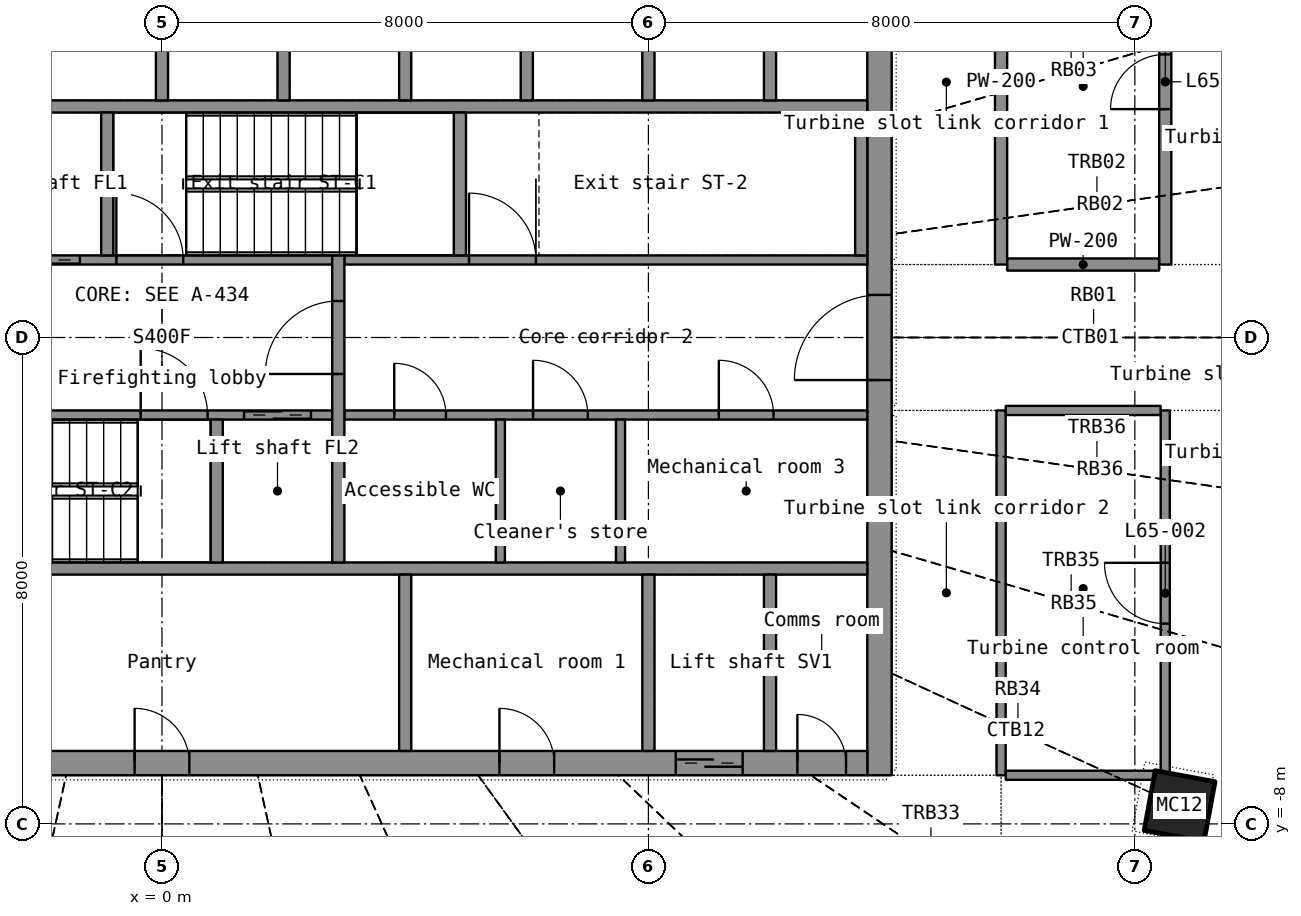
"""IFC4 building model, lengths in metres.
Left out: names, types, materials, properties, quantities, classifications, styles, units other than length and angle.
Written with IfcOpenShell. Run it as: python <this file> out.ifc"""

import sys

from ifc_helpers import new_model, si_unit, direction, frame, frame_2d, origin, origin_2d, place, context, subcontext, project, spatial, rectangle, hollow_rectangle, extrude, element, fill, save


model = new_model("IFC4")
c1 = context("Model", 3, precision=1e-05, world=origin(), true_north=direction((0.0, 1.0)))
c2 = subcontext(c1, "Body", "Model", "MODEL_VIEW")
j1 = project(units=[si_unit("LENGTHUNIT", "METRE"), si_unit("PLANEANGLEUNIT", "RADIAN")], contexts=[c1])
p1 = place(None, origin())
s1 = spatial("IfcSite", under=j1, at=p1, CompositionType="ELEMENT")
p2 = place(p1, origin())
s2 = spatial("IfcBuilding", under=s1, at=p2, CompositionType="ELEMENT")
p3 = place(p2, frame((0.0, 0.0, 265.2)))
s3 = spatial("IfcBuildingStorey", under=s2, at=p3, CompositionType="ELEMENT", Elevation=265.2)
p4 = place(p3, frame((16.736, -7.706, 0.0), z_axis=(-0.02993968, 0.014178483, 0.999451142), x_axis=(-0.58479336, -0.811160032, -0.006010807)))
e1 = element("IfcColumn", 1, at=p4, inside=s3, PredefinedType="COLUMN", context=c2, shape_type="SweptSolid", body=[
    extrude(hollow_rectangle(XDim=1.0, YDim=1.0, WallThickness=0.032, at=origin_2d()), origin(), (0.0, 0.0, 1.0), 7.404),
])
p5 = place(p3, frame((11.8, -7.2, 0.0), z_axis=(0.0, 0.0, 1.0), x_axis=(0.0, 1.0, 0.0)))
e2 = element("IfcWall", 2, at=p5, inside=s3, PredefinedType="SHEAR", context=c2, shape_type="SweptSolid", body=[
    extrude(rectangle(XDim=14.4, YDim=0.4, at=frame_2d((7.2, 0.0))), origin(), (0.0, 0.0, 1.0), 6.9),
])
p6 = place(p5, frame((6.5, 0.0, 0.0)))
e3 = element("IfcOpeningElement", 3, at=p6, cuts=e2, PredefinedType="OPENING", context=c2, shape_type="SweptSolid", body=[
    extrude(rectangle(XDim=1.4, YDim=2.2, at=frame_2d((0.7, 1.1))), frame((0.0, 0.21, 0.0), z_axis=(0.0, -1.0, 0.0), x_axis=(1.0, 0.0, 0.0)), (0.0, 0.0, 1.0), 0.42),
])
p7 = place(p3, frame((-11.6, -7.0, 0.0), z_axis=(0.0, 0.0, 1.0), x_axis=(1.0, 0.0, 0.0)))
e4 = element("IfcWall", 4, at=p7, inside=s3, PredefinedType="SHEAR", context=c2, shape_type="SweptSolid", body=[
    extrude(rectangle(XDim=23.2, YDim=0.4, at=frame_2d((11.6, 0.0))), origin(), (0.0, 0.0, 1.0), 6.9),
])
p8 = place(p7, frame((20.05, 0.0, 0.0)))
e5 = element("IfcOpeningElement", 5, at=p8, cuts=e4, PredefinedType="OPENING", context=c2, shape_type="SweptSolid", body=[
    extrude(rectangle(XDim=1.1, YDim=2.2, at=frame_2d((0.55, 1.1))), frame((0.0, 0.21, 0.0), z_axis=(0.0, -1.0, 0.0), x_axis=(1.0, 0.0, 0.0)), (0.0, 0.0, 1.0), 0.42),
])
p9 = place(p7, frame((4.15, 0.0, 0.0)))
e6 = element("IfcOpeningElement", 6, at=p9, cuts=e4, PredefinedType="OPENING", context=c2, shape_type="SweptSolid", body=[
    extrude(rectangle(XDim=0.9, YDim=2.1, at=frame_2d((0.45, 1.05))), frame((0.0, 0.21, 0.0), z_axis=(0.0, -1.0, 0.0), x_axis=(1.0, 0.0, 0.0)), (0.0, 0.0, 1.0), 0.42),
])
p10 = place(p7, frame((11.15, 0.0, 0.0)))
e7 = element("IfcOpeningElement", 7, at=p10, cuts=e4, PredefinedType="OPENING", context=c2, shape_type="SweptSolid", body=[
    extrude(rectangle(XDim=0.9, YDim=2.1, at=frame_2d((0.45, 1.05))), frame((0.0, 0.21, 0.0), z_axis=(0.0, -1.0, 0.0), x_axis=(1.0, 0.0, 0.0)), (0.0, 0.0, 1.0), 0.42),
])
p11 = place(p7, frame((17.15, 0.0, 0.0)))
e8 = element("IfcOpeningElement", 8, at=p11, cuts=e4, PredefinedType="OPENING", context=c2, shape_type="SweptSolid", body=[
    extrude(rectangle(XDim=0.9, YDim=2.1, at=frame_2d((0.45, 1.05))), frame((0.0, 0.21, 0.0), z_axis=(0.0, -1.0, 0.0), x_axis=(1.0, 0.0, 0.0)), (0.0, 0.0, 1.0), 0.42),
])
p12 = place(p7, frame((0.35, 0.0, 0.0)))
e9 = element("IfcOpeningElement", 9, at=p12, cuts=e4, PredefinedType="OPENING", context=c2, shape_type="SweptSolid", body=[
    extrude(rectangle(XDim=0.8, YDim=2.05, at=frame_2d((0.4, 1.025))), frame((0.0, 0.21, 0.0), z_axis=(0.0, -1.0, 0.0), x_axis=(1.0, 0.0, 0.0)), (0.0, 0.0, 1.0), 0.42),
])
p13 = place(p7, frame((22.05, 0.0, 0.0)))
e10 = element("IfcOpeningElement", 10, at=p13, cuts=e4, PredefinedType="OPENING", context=c2, shape_type="SweptSolid", body=[
    extrude(rectangle(XDim=0.8, YDim=2.05, at=frame_2d((0.4, 1.025))), frame((0.0, 0.21, 0.0), z_axis=(0.0, -1.0, 0.0), x_axis=(1.0, 0.0, 0.0)), (0.0, 0.0, 1.0), 0.42),
])
for number, where, z_axis, x_axis in (
    (11, (-11.6, -3.8, 0.0), (0.0, 0.0, 1.0), (1.0, 0.0, 0.0)),
    (12, (-11.6, 3.8, 0.0), (0.0, 0.0, 1.0), (1.0, 0.0, 0.0)),
):
    element("IfcWall", number, at=place(p3, frame(where, z_axis=z_axis, x_axis=x_axis)), inside=s3, PredefinedType="SHEAR", context=c2, shape_type="SweptSolid", body=[
        extrude(rectangle(XDim=23.2, YDim=0.2, at=frame_2d((11.6, 0.0))), origin(), (0.0, 0.0, 1.0), 6.9),
    ])
for number, where, z_axis, x_axis in (
    (13, (8.0, -6.8, 0.0), (0.0, 0.0, 1.0), (0.0, 1.0, 0.0)),
    (14, (10.0, -6.8, 0.0), (0.0, 0.0, 1.0), (0.0, 1.0, 0.0)),
):
    element("IfcWall", number, at=place(p3, frame(where, z_axis=z_axis, x_axis=x_axis)), inside=s3, PredefinedType="SHEAR", context=c2, shape_type="SweptSolid", body=[
        extrude(rectangle(XDim=2.9, YDim=0.2, at=frame_2d((1.45, 0.0))), origin(), (0.0, 0.0, 1.0), 6.9),
    ])
p14 = place(p3, frame((4.0, -6.8, 0.0), z_axis=(0.0, 0.0, 1.0), x_axis=(0.0, 1.0, 0.0)))
e15 = element("IfcWall", 15, at=p14, inside=s3, PredefinedType="PARTITIONING", context=c2, shape_type="SweptSolid", body=[
    extrude(rectangle(XDim=2.9, YDim=0.2, at=frame_2d((1.45, 0.0))), origin(), (0.0, 0.0, 1.0), 6.9),
])
for number, where, z_axis, x_axis in (
    (16, (0.0, 3.9, 0.0), (0.0, 0.0, 1.0), (0.0, 1.0, 0.0)),
    (17, (2.0, 3.9, 0.0), (0.0, 0.0, 1.0), (0.0, 1.0, 0.0)),
    (18, (4.0, 3.9, 0.0), (0.0, 0.0, 1.0), (0.0, 1.0, 0.0)),
    (19, (6.0, 3.9, 0.0), (0.0, 0.0, 1.0), (0.0, 1.0, 0.0)),
    (20, (8.0, 3.9, 0.0), (0.0, 0.0, 1.0), (0.0, 1.0, 0.0)),
    (21, (10.0, 3.9, 0.0), (0.0, 0.0, 1.0), (0.0, 1.0, 0.0)),
):
    element("IfcWall", number, at=place(p3, frame(where, z_axis=z_axis, x_axis=x_axis)), inside=s3, PredefinedType="SHEAR", context=c2, shape_type="SweptSolid", body=[
        extrude(rectangle(XDim=2.9, YDim=0.2, at=frame_2d((1.45, 0.0))), origin(), (0.0, 0.0, 1.0), 6.9),
    ])
p15 = place(p3, frame((-2.8, -1.275, 0.0), z_axis=(0.0, 0.0, 1.0), x_axis=(1.0, 0.0, 0.0)))
e22 = element("IfcWall", 22, at=p15, inside=s3, PredefinedType="SHEAR", context=c2, shape_type="SweptSolid", body=[
    extrude(rectangle(XDim=5.6, YDim=0.15, at=frame_2d((2.8, 0.0))), origin(), (0.0, 0.0, 1.0), 6.9),
])
p16 = place(p15, frame((4.15, 0.0, 0.0)))
e23 = element("IfcOpeningElement", 23, at=p16, cuts=e22, PredefinedType="OPENING", context=c2, shape_type="SweptSolid", body=[
    extrude(rectangle(XDim=1.1, YDim=2.2, at=frame_2d((0.55, 1.1))), frame((0.0, 0.085, 0.0), z_axis=(0.0, -1.0, 0.0), x_axis=(1.0, 0.0, 0.0)), (0.0, 0.0, 1.0), 0.17),
])
p17 = place(p15, frame((2.45, 0.0, 0.0)))
e24 = element("IfcOpeningElement", 24, at=p17, cuts=e22, PredefinedType="OPENING", context=c2, shape_type="SweptSolid", body=[
    extrude(rectangle(XDim=1.1, YDim=2.15, at=frame_2d((0.55, 1.075))), frame((0.0, 0.085, 0.0), z_axis=(0.0, -1.0, 0.0), x_axis=(1.0, 0.0, 0.0)), (0.0, 0.0, 1.0), 0.17),
])
p18 = place(p3, frame((3.0, -1.275, 0.0), z_axis=(0.0, 0.0, 1.0), x_axis=(1.0, 0.0, 0.0)))
e25 = element("IfcWall", 25, at=p18, inside=s3, PredefinedType="PARTITIONING", context=c2, shape_type="SweptSolid", body=[
    extrude(rectangle(XDim=8.6, YDim=0.15, at=frame_2d((4.3, 0.0))), origin(), (0.0, 0.0, 1.0), 6.9),
])
p19 = place(p18, frame((0.82, 0.0, 0.0)))
e26 = element("IfcOpeningElement", 26, at=p19, cuts=e25, PredefinedType="OPENING", context=c2, shape_type="SweptSolid", body=[
    extrude(rectangle(XDim=0.85, YDim=2.1, at=frame_2d((0.425, 1.05))), frame((0.0, 0.085, 0.0), z_axis=(0.0, -1.0, 0.0), x_axis=(1.0, 0.0, 0.0)), (0.0, 0.0, 1.0), 0.17),
])
p20 = place(p18, frame((3.103, 0.0, 0.0)))
e27 = element("IfcOpeningElement", 27, at=p20, cuts=e25, PredefinedType="OPENING", context=c2, shape_type="SweptSolid", body=[
    extrude(rectangle(XDim=0.9, YDim=2.1, at=frame_2d((0.45, 1.05))), frame((0.0, 0.085, 0.0), z_axis=(0.0, -1.0, 0.0), x_axis=(1.0, 0.0, 0.0)), (0.0, 0.0, 1.0), 0.17),
])
p21 = place(p18, frame((6.158, 0.0, 0.0)))
e28 = element("IfcOpeningElement", 28, at=p21, cuts=e25, PredefinedType="OPENING", context=c2, shape_type="SweptSolid", body=[
    extrude(rectangle(XDim=0.9, YDim=2.1, at=frame_2d((0.45, 1.05))), frame((0.0, 0.085, 0.0), z_axis=(0.0, -1.0, 0.0), x_axis=(1.0, 0.0, 0.0)), (0.0, 0.0, 1.0), 0.17),
])
p22 = place(p3, frame((-2.8, 1.275, 0.0), z_axis=(0.0, 0.0, 1.0), x_axis=(1.0, 0.0, 0.0)))
e29 = element("IfcWall", 29, at=p22, inside=s3, PredefinedType="SHEAR", context=c2, shape_type="SweptSolid", body=[
    extrude(rectangle(XDim=5.6, YDim=0.15, at=frame_2d((2.8, 0.0))), origin(), (0.0, 0.0, 1.0), 6.9),
])
p23 = place(p22, frame((0.35, 0.0, 0.0)))
e30 = element("IfcOpeningElement", 30, at=p23, cuts=e29, PredefinedType="OPENING", context=c2, shape_type="SweptSolid", body=[
    extrude(rectangle(XDim=1.1, YDim=2.2, at=frame_2d((0.55, 1.1))), frame((0.0, 0.085, 0.0), z_axis=(0.0, -1.0, 0.0), x_axis=(1.0, 0.0, 0.0)), (0.0, 0.0, 1.0), 0.17),
])
p24 = place(p22, frame((2.05, 0.0, 0.0)))
e31 = element("IfcOpeningElement", 31, at=p24, cuts=e29, PredefinedType="OPENING", context=c2, shape_type="SweptSolid", body=[
    extrude(rectangle(XDim=1.1, YDim=2.15, at=frame_2d((0.55, 1.075))), frame((0.0, 0.085, 0.0), z_axis=(0.0, -1.0, 0.0), x_axis=(1.0, 0.0, 0.0)), (0.0, 0.0, 1.0), 0.17),
])
p25 = place(p3, frame((3.0, 1.275, 0.0), z_axis=(0.0, 0.0, 1.0), x_axis=(1.0, 0.0, 0.0)))
e32 = element("IfcWall", 32, at=p25, inside=s3, PredefinedType="SHEAR", context=c2, shape_type="SweptSolid", body=[
    extrude(rectangle(XDim=8.6, YDim=0.15, at=frame_2d((4.3, 0.0))), origin(), (0.0, 0.0, 1.0), 6.9),
])
p26 = place(p25, frame((2.05, 0.0, 0.0)))
e33 = element("IfcOpeningElement", 33, at=p26, cuts=e32, PredefinedType="OPENING", context=c2, shape_type="SweptSolid", body=[
    extrude(rectangle(XDim=1.1, YDim=2.15, at=frame_2d((0.55, 1.075))), frame((0.0, 0.085, 0.0), z_axis=(0.0, -1.0, 0.0), x_axis=(1.0, 0.0, 0.0)), (0.0, 0.0, 1.0), 0.17),
])
p27 = place(p3, frame((2.9, -3.7, 0.0), z_axis=(0.0, 0.0, 1.0), x_axis=(0.0, 1.0, 0.0)))
e34 = element("IfcWall", 34, at=p27, inside=s3, PredefinedType="SHEAR", context=c2, shape_type="SweptSolid", body=[
    extrude(rectangle(XDim=5.05, YDim=0.2, at=frame_2d((2.525, 0.0))), origin(), (0.0, 0.0, 1.0), 6.9),
])
p28 = place(p27, frame((3.1, 0.0, 0.0)))
e35 = element("IfcOpeningElement", 35, at=p28, cuts=e34, PredefinedType="OPENING", context=c2, shape_type="SweptSolid", body=[
    extrude(rectangle(XDim=1.2, YDim=2.2, at=frame_2d((0.6, 1.1))), frame((0.0, 0.11, 0.0), z_axis=(0.0, -1.0, 0.0), x_axis=(1.0, 0.0, 0.0)), (0.0, 0.0, 1.0), 0.22),
])
for number, where, z_axis, x_axis in (
    (36, (-0.9, 1.35, 0.0), (0.0, 0.0, 1.0), (0.0, 1.0, 0.0)),
    (37, (0.9, -3.7, 0.0), (0.0, 0.0, 1.0), (0.0, 1.0, 0.0)),
    (38, (11.5, 1.35, 0.0), (0.0, 0.0, 1.0), (0.0, 1.0, 0.0)),
    (39, (4.9, 1.35, 0.0), (0.0, 0.0, 1.0), (0.0, 1.0, 0.0)),
):
    element("IfcWall", number, at=place(p3, frame(where, z_axis=z_axis, x_axis=x_axis)), inside=s3, PredefinedType="SHEAR", context=c2, shape_type="SweptSolid", body=[
        extrude(rectangle(XDim=2.35, YDim=0.2, at=frame_2d((1.175, 0.0))), origin(), (0.0, 0.0, 1.0), 6.9),
    ])
for number, where, z_axis, x_axis in (
    (40, (5.565, -3.7, 0.0), (0.0, 0.0, 1.0), (0.0, 1.0, 0.0)),
    (41, (7.541, -3.7, 0.0), (0.0, 0.0, 1.0), (0.0, 1.0, 0.0)),
):
    element("IfcWall", number, at=place(p3, frame(where, z_axis=z_axis, x_axis=x_axis)), inside=s3, PredefinedType="PARTITIONING", context=c2, shape_type="SweptSolid", body=[
        extrude(rectangle(XDim=2.35, YDim=0.15, at=frame_2d((1.175, 0.0))), origin(), (0.0, 0.0, 1.0), 6.9),
    ])
p29 = place(p3, frame((16.5, -7.212, 0.0), z_axis=(0.0, 0.0, 1.0), x_axis=(0.0, 1.0, 0.0)))
e42 = element("IfcWall", 42, at=p29, inside=s3, PredefinedType="PARTITIONING", context=c2, shape_type="SweptSolid", body=[
    extrude(rectangle(XDim=6.012, YDim=0.15, at=frame_2d((3.006, 0.0))), origin(), (0.0, 0.0, 1.0), 6.1),
])
p30 = place(p29, frame((2.506, 0.0, 0.0)))
e43 = element("IfcOpeningElement", 43, at=p30, cuts=e42, PredefinedType="OPENING", context=c2, shape_type="SweptSolid", body=[
    extrude(rectangle(XDim=1.0, YDim=2.2, at=frame_2d((0.5, 1.1))), frame((0.0, 0.085, 0.0), z_axis=(0.0, -1.0, 0.0), x_axis=(1.0, 0.0, 0.0)), (0.0, 0.0, 1.0), 0.17),
])
p31 = place(p3, frame((16.5, 1.2, 0.0), z_axis=(0.0, 0.0, 1.0), x_axis=(0.0, 1.0, 0.0)))
e44 = element("IfcWall", 44, at=p31, inside=s3, PredefinedType="PARTITIONING", context=c2, shape_type="SweptSolid", body=[
    extrude(rectangle(XDim=6.012, YDim=0.2, at=frame_2d((3.006, 0.0))), origin(), (0.0, 0.0, 1.0), 6.1),
])
p32 = place(p31, frame((2.556, 0.0, 0.0)))
e45 = element("IfcOpeningElement", 45, at=p32, cuts=e44, PredefinedType="OPENING", context=c2, shape_type="SweptSolid", body=[
    extrude(rectangle(XDim=0.9, YDim=2.1, at=frame_2d((0.45, 1.05))), frame((0.0, 0.11, 0.0), z_axis=(0.0, -1.0, 0.0), x_axis=(1.0, 0.0, 0.0)), (0.0, 0.0, 1.0), 0.22),
])
p33 = place(p3, frame((13.8, -7.2, 0.0), z_axis=(0.0, 0.0, 1.0), x_axis=(0.0, 1.0, 0.0)))
e46 = element("IfcWall", 46, at=p33, inside=s3, PredefinedType="PARTITIONING", context=c2, shape_type="SweptSolid", body=[
    extrude(rectangle(XDim=6.0, YDim=0.15, at=frame_2d((3.0, 0.0))), origin(), (0.0, 0.0, 1.0), 6.1),
])
p34 = place(p3, frame((13.8, 1.2, 0.0), z_axis=(0.0, 0.0, 1.0), x_axis=(0.0, 1.0, 0.0)))
e47 = element("IfcWall", 47, at=p34, inside=s3, PredefinedType="PARTITIONING", context=c2, shape_type="SweptSolid", body=[
    extrude(rectangle(XDim=6.0, YDim=0.2, at=frame_2d((3.0, 0.0))), origin(), (0.0, 0.0, 1.0), 6.1),
])
for number, where, z_axis, x_axis in (
    (48, (13.877, -7.2, 0.0), (0.0, 0.0, 1.0), (1.0, 0.0, 0.0)),
    (49, (13.877, -1.2, 0.0), (0.0, 0.0, 1.0), (1.0, 0.0, 0.0)),
):
    element("IfcWall", number, at=place(p3, frame(where, z_axis=z_axis, x_axis=x_axis)), inside=s3, PredefinedType="PARTITIONING", context=c2, shape_type="SweptSolid", body=[
        extrude(rectangle(XDim=2.546, YDim=0.15, at=frame_2d((1.273, 0.0))), origin(), (0.0, 0.0, 1.0), 6.1),
    ])
p35 = place(p3, frame((16.398, 1.2, 0.0), z_axis=(0.0, 0.0, 1.0), x_axis=(-1.0, 0.0, 0.0)))
e50 = element("IfcWall", 50, at=p35, inside=s3, PredefinedType="PARTITIONING", context=c2, shape_type="SweptSolid", body=[
    extrude(rectangle(XDim=2.496, YDim=0.2, at=frame_2d((1.248, 0.0))), origin(), (0.0, 0.0, 1.0), 6.1),
])
p36 = place(p8, origin())
e51 = element("IfcDoor", 51, at=p36, inside=s3, OperationType="DOUBLE_DOOR_SLIDING", PredefinedType="DOOR", context=c2, shape_type="SweptSolid", body=[
    extrude(rectangle(XDim=1.1, YDim=2.2, at=frame_2d((0.55, 1.1))), frame((0.0, 0.025, 0.0), z_axis=(0.0, -1.0, 0.0), x_axis=(1.0, 0.0, 0.0)), (0.0, 0.0, 1.0), 0.05),
])
fill(e5, e51)
p37 = place(p10, origin())
e52 = element("IfcDoor", 52, at=p37, inside=s3, OperationType="SINGLE_SWING_LEFT", PredefinedType="DOOR", context=c2, shape_type="SweptSolid", body=[
    extrude(rectangle(XDim=0.9, YDim=2.1, at=frame_2d((0.45, 1.05))), frame((0.0, 0.025, 0.0), z_axis=(0.0, -1.0, 0.0), x_axis=(1.0, 0.0, 0.0)), (0.0, 0.0, 1.0), 0.05),
])
fill(e7, e52)
p38 = place(p11, origin())
e53 = element("IfcDoor", 53, at=p38, inside=s3, OperationType="SINGLE_SWING_LEFT", PredefinedType="DOOR", context=c2, shape_type="SweptSolid", body=[
    extrude(rectangle(XDim=0.9, YDim=2.1, at=frame_2d((0.45, 1.05))), frame((0.0, 0.025, 0.0), z_axis=(0.0, -1.0, 0.0), x_axis=(1.0, 0.0, 0.0)), (0.0, 0.0, 1.0), 0.05),
])
fill(e8, e53)
p39 = place(p13, origin())
e54 = element("IfcDoor", 54, at=p39, inside=s3, OperationType="SINGLE_SWING_LEFT", PredefinedType="DOOR", context=c2, shape_type="SweptSolid", body=[
    extrude(rectangle(XDim=0.8, YDim=2.05, at=frame_2d((0.4, 1.025))), frame((0.0, 0.025, 0.0), z_axis=(0.0, -1.0, 0.0), x_axis=(1.0, 0.0, 0.0)), (0.0, 0.0, 1.0), 0.05),
])
fill(e10, e54)
p40 = place(p6, origin())
e55 = element("IfcDoor", 55, at=p40, inside=s3, OperationType="DOUBLE_DOOR_SINGLE_SWING", PredefinedType="DOOR", context=c2, shape_type="SweptSolid", body=[
    extrude(rectangle(XDim=1.4, YDim=2.2, at=frame_2d((0.7, 1.1))), frame((0.0, 0.025, 0.0), z_axis=(0.0, -1.0, 0.0), x_axis=(1.0, 0.0, 0.0)), (0.0, 0.0, 1.0), 0.05),
])
fill(e3, e55)
p41 = place(p28, origin())
e56 = element("IfcDoor", 56, at=p41, inside=s3, OperationType="SINGLE_SWING_LEFT", PredefinedType="DOOR", context=c2, shape_type="SweptSolid", body=[
    extrude(rectangle(XDim=1.2, YDim=2.2, at=frame_2d((0.6, 1.1))), frame((0.0, 0.025, 0.0), z_axis=(0.0, -1.0, 0.0), x_axis=(1.0, 0.0, 0.0)), (0.0, 0.0, 1.0), 0.05),
])
fill(e35, e56)
p42 = place(p23, origin())
e57 = element("IfcDoor", 57, at=p42, inside=s3, OperationType="DOUBLE_DOOR_SLIDING", PredefinedType="DOOR", context=c2, shape_type="SweptSolid", body=[
    extrude(rectangle(XDim=1.1, YDim=2.2, at=frame_2d((0.55, 1.1))), frame((0.0, 0.025, 0.0), z_axis=(0.0, -1.0, 0.0), x_axis=(1.0, 0.0, 0.0)), (0.0, 0.0, 1.0), 0.05),
])
fill(e30, e57)
p43 = place(p16, origin())
e58 = element("IfcDoor", 58, at=p43, inside=s3, OperationType="DOUBLE_DOOR_SLIDING", PredefinedType="DOOR", context=c2, shape_type="SweptSolid", body=[
    extrude(rectangle(XDim=1.1, YDim=2.2, at=frame_2d((0.55, 1.1))), frame((0.0, 0.025, 0.0), z_axis=(0.0, -1.0, 0.0), x_axis=(1.0, 0.0, 0.0)), (0.0, 0.0, 1.0), 0.05),
])
fill(e23, e58)
p44 = place(p26, origin())
e59 = element("IfcDoor", 59, at=p44, inside=s3, OperationType="SINGLE_SWING_LEFT", PredefinedType="DOOR", context=c2, shape_type="SweptSolid", body=[
    extrude(rectangle(XDim=1.1, YDim=2.15, at=frame_2d((0.55, 1.075))), frame((0.0, 0.025, 0.0), z_axis=(0.0, -1.0, 0.0), x_axis=(1.0, 0.0, 0.0)), (0.0, 0.0, 1.0), 0.05),
])
fill(e33, e59)
p45 = place(p19, origin())
e60 = element("IfcDoor", 60, at=p45, inside=s3, OperationType="SINGLE_SWING_LEFT", PredefinedType="DOOR", context=c2, shape_type="SweptSolid", body=[
    extrude(rectangle(XDim=0.85, YDim=2.1, at=frame_2d((0.425, 1.05))), frame((0.0, 0.025, 0.0), z_axis=(0.0, -1.0, 0.0), x_axis=(1.0, 0.0, 0.0)), (0.0, 0.0, 1.0), 0.05),
])
fill(e26, e60)
p46 = place(p20, origin())
e61 = element("IfcDoor", 61, at=p46, inside=s3, OperationType="SINGLE_SWING_LEFT", PredefinedType="DOOR", context=c2, shape_type="SweptSolid", body=[
    extrude(rectangle(XDim=0.9, YDim=2.1, at=frame_2d((0.45, 1.05))), frame((0.0, 0.025, 0.0), z_axis=(0.0, -1.0, 0.0), x_axis=(1.0, 0.0, 0.0)), (0.0, 0.0, 1.0), 0.05),
])
fill(e27, e61)
p47 = place(p21, origin())
e62 = element("IfcDoor", 62, at=p47, inside=s3, OperationType="SINGLE_SWING_LEFT", PredefinedType="DOOR", context=c2, shape_type="SweptSolid", body=[
    extrude(rectangle(XDim=0.9, YDim=2.1, at=frame_2d((0.45, 1.05))), frame((0.0, 0.025, 0.0), z_axis=(0.0, -1.0, 0.0), x_axis=(1.0, 0.0, 0.0)), (0.0, 0.0, 1.0), 0.05),
])
fill(e28, e62)
p48 = place(p24, origin())
e63 = element("IfcDoor", 63, at=p48, inside=s3, OperationType="SINGLE_SWING_LEFT", PredefinedType="DOOR", context=c2, shape_type="SweptSolid", body=[
    extrude(rectangle(XDim=1.1, YDim=2.15, at=frame_2d((0.55, 1.075))), frame((0.0, 0.025, 0.0), z_axis=(0.0, -1.0, 0.0), x_axis=(1.0, 0.0, 0.0)), (0.0, 0.0, 1.0), 0.05),
])
fill(e31, e63)
p49 = place(p17, origin())
e64 = element("IfcDoor", 64, at=p49, inside=s3, OperationType="SINGLE_SWING_LEFT", PredefinedType="DOOR", context=c2, shape_type="SweptSolid", body=[
    extrude(rectangle(XDim=1.1, YDim=2.15, at=frame_2d((0.55, 1.075))), frame((0.0, 0.025, 0.0), z_axis=(0.0, -1.0, 0.0), x_axis=(1.0, 0.0, 0.0)), (0.0, 0.0, 1.0), 0.05),
])
fill(e24, e64)
p50 = place(p32, origin())
e65 = element("IfcDoor", 65, at=p50, inside=s3, OperationType="SINGLE_SWING_LEFT", PredefinedType="DOOR", context=c2, shape_type="SweptSolid", body=[
    extrude(rectangle(XDim=0.9, YDim=2.1, at=frame_2d((0.45, 1.05))), frame((0.0, 0.025, 0.0), z_axis=(0.0, -1.0, 0.0), x_axis=(1.0, 0.0, 0.0)), (0.0, 0.0, 1.0), 0.05),
])
fill(e45, e65)
p51 = place(p30, origin())
e66 = element("IfcDoor", 66, at=p51, inside=s3, OperationType="SINGLE_SWING_RIGHT", PredefinedType="DOOR", context=c2, shape_type="SweptSolid", body=[
    extrude(rectangle(XDim=1.0, YDim=2.2, at=frame_2d((0.5, 1.1))), frame((0.0, 0.025, 0.0), z_axis=(0.0, -1.0, 0.0), x_axis=(1.0, 0.0, 0.0)), (0.0, 0.0, 1.0), 0.05),
])
fill(e43, e66)
save(model, sys.argv[1])
